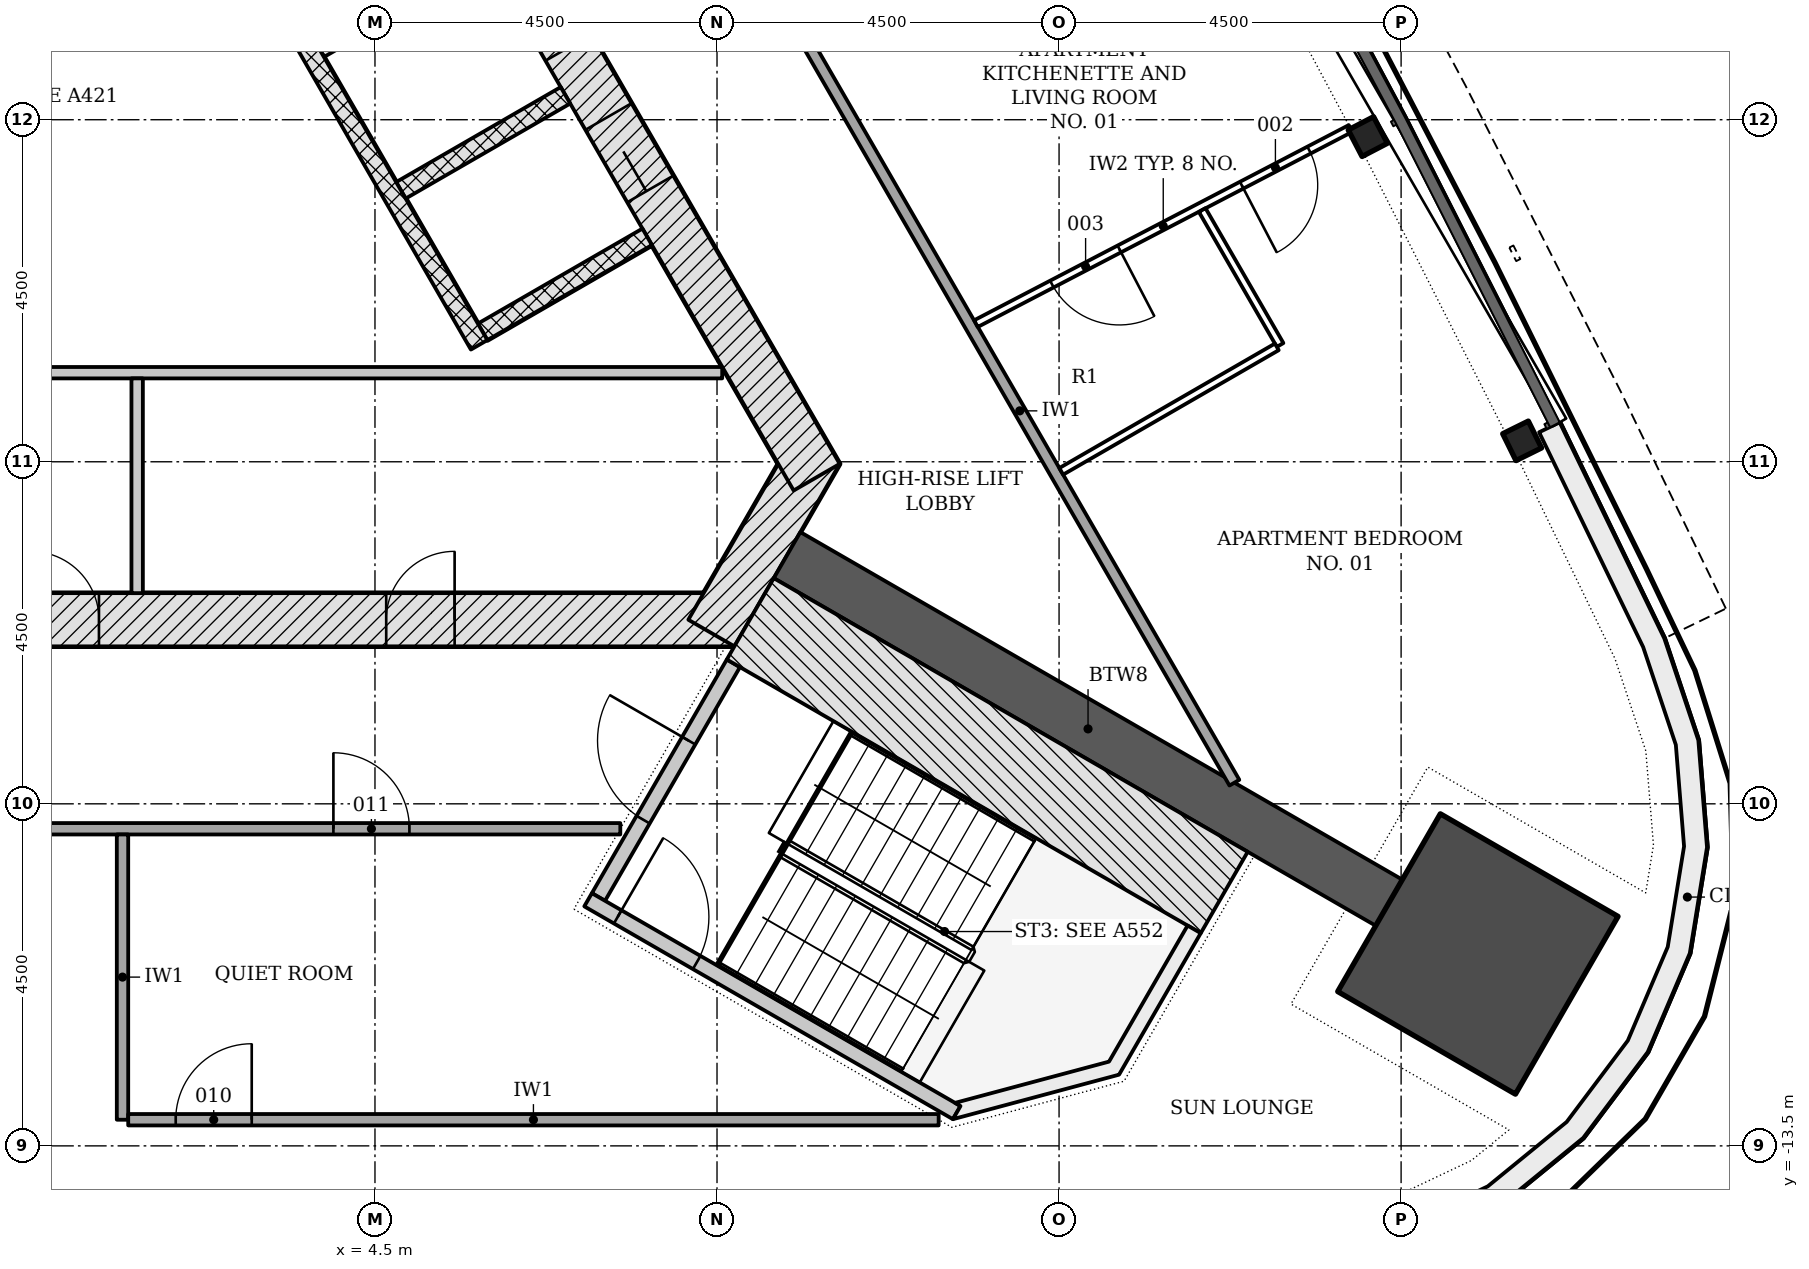
"""IFC4 building model, lengths in metres.
Left out: names, types, materials, properties, quantities, classifications, styles, units other than length and angle.
Written with IfcOpenShell. Run it as: python <this file> out.ifc"""

import sys

from ifc_helpers import new_model, si_unit, direction, frame, frame_2d, origin, origin_2d, place, context, subcontext, project, spatial, polyline, rectangle, i_section, outline, extrude, element, fill, save


model = new_model("IFC4")
c1 = context("Model", 3, precision=1e-05, world=origin(), true_north=direction((0.0, 1.0)))
c2 = subcontext(c1, "Body", "Model", "MODEL_VIEW")
j1 = project(units=[si_unit("LENGTHUNIT", "METRE"), si_unit("PLANEANGLEUNIT", "RADIAN")], contexts=[c1])
p1 = place(None, origin())
s1 = spatial("IfcSite", under=j1, at=p1, CompositionType="ELEMENT")
p2 = place(p1, origin())
s2 = spatial("IfcBuilding", under=s1, at=p2, CompositionType="ELEMENT")
p3 = place(p2, frame((0.0, 0.0, 192.3)))
s3 = spatial("IfcBuildingStorey", under=s2, at=p3, CompositionType="ELEMENT", Elevation=192.3)
p4 = place(p3, frame((-9.229, -6.578, -0.2), z_axis=(0.0, 0.0, 1.0), x_axis=(1.0, 0.0, 0.0)))
e1 = element("IfcWall", 1, at=p4, inside=s3, PredefinedType="SHEAR", context=c2, shape_type="SweptSolid", body=[
    extrude(rectangle(XDim=18.458, YDim=0.7, at=frame_2d((9.229, 0.0))), origin(), (0.0, 0.0, 1.0), 3.6),
])
p5 = place(p4, frame((6.1, 0.0, 0.2)))
e2 = element("IfcOpeningElement", 2, at=p5, cuts=e1, PredefinedType="OPENING", context=c2, shape_type="SweptSolid", body=[
    extrude(rectangle(XDim=1.0, YDim=2.1, at=frame_2d((0.5, 1.05))), frame((0.0, 0.36, 0.0), z_axis=(0.0, -1.0, 0.0), x_axis=(1.0, 0.0, 0.0)), (0.0, 0.0, 1.0), 0.72),
])
p6 = place(p4, frame((2.615, 0.0, 0.2)))
e3 = element("IfcOpeningElement", 3, at=p6, cuts=e1, PredefinedType="OPENING", context=c2, shape_type="SweptSolid", body=[
    extrude(rectangle(XDim=1.0, YDim=2.1, at=frame_2d((0.5, 1.05))), frame((0.0, 0.36, 0.0), z_axis=(0.0, -1.0, 0.0), x_axis=(1.0, 0.0, 0.0)), (0.0, 0.0, 1.0), 0.72),
])
p7 = place(p4, frame((9.198, 0.0, 0.2)))
e4 = element("IfcOpeningElement", 4, at=p7, cuts=e1, PredefinedType="OPENING", context=c2, shape_type="SweptSolid", body=[
    extrude(rectangle(XDim=0.9, YDim=2.1, at=frame_2d((0.45, 1.05))), frame((0.0, 0.36, 0.0), z_axis=(0.0, -1.0, 0.0), x_axis=(1.0, 0.0, 0.0)), (0.0, 0.0, 1.0), 0.72),
])
p8 = place(p4, frame((13.877, 0.0, 0.2)))
e5 = element("IfcOpeningElement", 5, at=p8, cuts=e1, PredefinedType="OPENING", context=c2, shape_type="SweptSolid", body=[
    extrude(rectangle(XDim=0.9, YDim=2.1, at=frame_2d((0.45, 1.05))), frame((0.0, 0.36, 0.0), z_axis=(0.0, -1.0, 0.0), x_axis=(1.0, 0.0, 0.0)), (0.0, 0.0, 1.0), 0.72),
])
p9 = place(p3, frame((8.926, -6.753, -0.2), z_axis=(0.0, 0.0, 1.0), x_axis=(0.500042739161, 0.866000726912, 0.0)))
e6 = element("IfcWall", 6, at=p9, inside=s3, PredefinedType="SHEAR", context=c2, shape_type="SweptSolid", body=[
    extrude(rectangle(XDim=2.771, YDim=0.7, at=frame_2d((1.386, 0.0))), origin(), (0.0, 0.0, 1.0), 3.6),
])
p10 = place(p3, frame((10.311, -4.703, -0.2), z_axis=(0.0, 0.0, 1.0), x_axis=(-0.500001446645, 0.866024568562, 0.0)))
e7 = element("IfcWall", 7, at=p10, inside=s3, PredefinedType="SHEAR", context=c2, shape_type="SweptSolid", body=[
    extrude(rectangle(XDim=18.458, YDim=0.7, at=frame_2d((9.229, 0.0))), origin(), (0.0, 0.0, 1.0), 3.6),
])
p11 = place(p10, frame((4.379, 0.0, 0.2)))
e8 = element("IfcOpeningElement", 8, at=p11, cuts=e7, PredefinedType="OPENING", context=c2, shape_type="SweptSolid", body=[
    extrude(rectangle(XDim=1.1, YDim=2.1, at=frame_2d((0.55, 1.05))), frame((0.0, 0.36, 0.0), z_axis=(0.0, -1.0, 0.0), x_axis=(1.0, 0.0, 0.0)), (0.0, 0.0, 1.0), 0.72),
])
p12 = place(p10, frame((6.529, 0.0, 0.2)))
e9 = element("IfcOpeningElement", 9, at=p12, cuts=e7, PredefinedType="OPENING", context=c2, shape_type="SweptSolid", body=[
    extrude(rectangle(XDim=1.1, YDim=2.1, at=frame_2d((0.55, 1.05))), frame((0.0, 0.36, 0.0), z_axis=(0.0, -1.0, 0.0), x_axis=(1.0, 0.0, 0.0)), (0.0, 0.0, 1.0), 0.72),
])
p13 = place(p10, frame((8.679, 0.0, 0.2)))
e10 = element("IfcOpeningElement", 10, at=p13, cuts=e7, PredefinedType="OPENING", context=c2, shape_type="SweptSolid", body=[
    extrude(rectangle(XDim=1.1, YDim=2.1, at=frame_2d((0.55, 1.05))), frame((0.0, 0.36, 0.0), z_axis=(0.0, -1.0, 0.0), x_axis=(1.0, 0.0, 0.0)), (0.0, 0.0, 1.0), 0.72),
])
p14 = place(p10, frame((10.829, 0.0, 0.2)))
e11 = element("IfcOpeningElement", 11, at=p14, cuts=e7, PredefinedType="OPENING", context=c2, shape_type="SweptSolid", body=[
    extrude(rectangle(XDim=1.1, YDim=2.1, at=frame_2d((0.55, 1.05))), frame((0.0, 0.36, 0.0), z_axis=(0.0, -1.0, 0.0), x_axis=(1.0, 0.0, 0.0)), (0.0, 0.0, 1.0), 0.72),
])
p15 = place(p10, frame((12.979, 0.0, 0.2)))
e12 = element("IfcOpeningElement", 12, at=p15, cuts=e7, PredefinedType="OPENING", context=c2, shape_type="SweptSolid", body=[
    extrude(rectangle(XDim=1.1, YDim=2.1, at=frame_2d((0.55, 1.05))), frame((0.0, 0.36, 0.0), z_axis=(0.0, -1.0, 0.0), x_axis=(1.0, 0.0, 0.0)), (0.0, 0.0, 1.0), 0.72),
])
p16 = place(p3, frame((9.922, -5.728, -0.2), z_axis=(0.0, 0.0, 1.0), x_axis=(0.866026421479, -0.499998237297, 0.0)))
e13 = element("IfcWall", 13, at=p16, inside=s3, PredefinedType="SHEAR", context=c2, shape_type="SweptSolid", body=[
    extrude(rectangle(XDim=9.145, YDim=0.7, at=frame_2d((4.572, 0.0))), origin(), (0.0, 0.0, 1.0), 3.6),
])
p17 = place(p3, frame((19.01, -10.976, -0.2), z_axis=(0.0, 0.0, 1.0), x_axis=(0.866025403784, -0.5, 0.0)))
e14 = element("IfcColumn", 14, at=p17, inside=s3, PredefinedType="COLUMN", context=c2, shape_type="SweptSolid", body=[
    extrude(rectangle(XDim=2.7, YDim=2.7, at=origin_2d()), origin(), (0.0, 0.0, 1.0), 3.6),
])
for number, where, z_axis, x_axis in (
    (15, (19.593, -4.225, -0.2), (0.0, 0.0, 1.0), (-0.443, 0.897, 0.0)),
    (16, (17.562, -0.222, -0.2), (0.0, 0.0, 1.0), (-0.462, 0.887, 0.0)),
):
    element("IfcColumn", number, at=place(p3, frame(where, z_axis=z_axis, x_axis=x_axis)), inside=s3, PredefinedType="COLUMN", context=c2, shape_type="SweptSolid", body=[
        extrude(i_section(OverallWidth=0.394, OverallDepth=0.376, WebThickness=0.017, FlangeThickness=0.028, FilletRadius=0.015, at=origin_2d()), origin(), (0.0, 0.0, 1.0), 3.6),
    ])
p18 = place(p3, origin())
e17 = element("IfcWall", 17, at=p18, inside=s3, PredefinedType="NOTDEFINED", context=c2, shape_type="SweptSolid", body=[
    extrude(outline(polyline([(13.49, -15.404), (16.641, -15.175), (18.025, -14.893), (19.302, -14.288), (20.396, -13.395), (21.245, -12.266), (21.798, -10.966), (22.025, -9.572), (21.91, -8.164), (21.463, -6.824), (20.086, -3.981), (19.816, -4.112), (21.184, -6.937), (21.615, -8.224), (21.723, -9.56), (21.508, -10.882), (20.983, -12.115), (20.178, -13.186), (19.14, -14.032), (17.929, -14.606), (16.6, -14.877), (13.469, -15.105), (13.49, -15.404)])), origin(), (0.0, 0.0, 1.0), 3.3),
])
for number, where, z_axis, x_axis in (
    (18, (8.081, -1.541, -0.2), (0.0, 0.0, 1.0), (-0.866, -0.5, 0.0)),
    (19, (7.006, 0.321, -0.2), (0.0, 0.0, 1.0), (-0.866, -0.5, 0.0)),
):
    element("IfcWall", number, at=place(p3, frame(where, z_axis=z_axis, x_axis=x_axis)), inside=s3, PredefinedType="PARTITIONING", context=c2, shape_type="SweptSolid", body=[
        extrude(rectangle(XDim=2.5, YDim=0.25, at=frame_2d((1.25, 0.0))), origin(), (0.0, 0.0, 1.0), 3.6),
    ])
p19 = place(p3, frame((5.931, 2.183, -0.2), z_axis=(0.0, 0.0, 1.0), x_axis=(-0.866047370643, -0.499961950354, 0.0)))
e20 = element("IfcWall", 20, at=p19, inside=s3, PredefinedType="PARTITIONING", context=c2, shape_type="SweptSolid", body=[
    extrude(rectangle(XDim=2.5, YDim=0.25, at=frame_2d((1.25, 0.0))), origin(), (0.0, 0.0, 1.0), 3.6),
])
p20 = place(p3, frame((5.87, -2.961, 0.0), z_axis=(0.0, 0.0, 1.0), x_axis=(-0.50000615651, 0.866021849293, 0.0)))
e21 = element("IfcWall", 21, at=p20, inside=s3, PredefinedType="PARTITIONING", context=c2, shape_type="SweptSolid", body=[
    extrude(rectangle(XDim=11.0, YDim=0.25, at=frame_2d((5.5, 0.0))), origin(), (0.0, 0.0, 1.0), 3.4),
])
p21 = place(p3, frame((-1.479, -3.328, 0.0), z_axis=(0.0, 0.0, 1.0), x_axis=(1.0, 0.0, 0.0)))
e22 = element("IfcWall", 22, at=p21, inside=s3, PredefinedType="PARTITIONING", context=c2, shape_type="SweptSolid", body=[
    extrude(rectangle(XDim=10.547, YDim=0.15, at=frame_2d((5.273, 0.0))), origin(), (0.0, 0.0, 1.0), 3.4),
])
p22 = place(p3, frame((1.371, -3.403, 0.0), z_axis=(0.0, 0.0, 1.0), x_axis=(0.0, -1.0, 0.0)))
e23 = element("IfcWall", 23, at=p22, inside=s3, PredefinedType="PARTITIONING", context=c2, shape_type="SweptSolid", body=[
    extrude(rectangle(XDim=2.825, YDim=0.15, at=frame_2d((1.413, 0.0))), origin(), (0.0, 0.0, 1.0), 3.4),
])
p23 = place(p3, frame((7.44, -10.226, -0.2), z_axis=(0.0, 0.0, 1.0), x_axis=(0.500022077904, 0.866012656725, 0.0)))
e24 = element("IfcWall", 24, at=p23, inside=s3, PredefinedType="SHEAR", context=c2, shape_type="SweptSolid", body=[
    extrude(rectangle(XDim=3.55, YDim=0.2, at=frame_2d((1.775, 0.0))), origin(), (0.0, 0.0, 1.0), 3.6),
])
p24 = place(p23, frame((1.175, 0.0, 0.2)))
e25 = element("IfcOpeningElement", 25, at=p24, cuts=e24, PredefinedType="OPENING", context=c2, shape_type="SweptSolid", body=[
    extrude(rectangle(XDim=1.2, YDim=2.1, at=frame_2d((0.6, 1.05))), frame((0.0, 0.11, 0.0), z_axis=(0.0, -1.0, 0.0), x_axis=(1.0, 0.0, 0.0)), (0.0, 0.0, 1.0), 0.22),
])
p25 = place(p3, frame((7.304, -10.262, -0.2), z_axis=(0.0, 0.0, 1.0), x_axis=(0.866026594901, -0.49999793692, 0.0)))
e26 = element("IfcWall", 26, at=p25, inside=s3, PredefinedType="SHEAR", context=c2, shape_type="SweptSolid", body=[
    extrude(rectangle(XDim=5.6, YDim=0.2, at=frame_2d((2.8, 0.0))), origin(), (0.0, 0.0, 1.0), 3.6),
])
p26 = place(p25, frame((0.45, 0.0, 0.2)))
e27 = element("IfcOpeningElement", 27, at=p26, cuts=e26, PredefinedType="OPENING", context=c2, shape_type="SweptSolid", body=[
    extrude(rectangle(XDim=1.2, YDim=2.1, at=frame_2d((0.6, 1.05))), frame((0.0, 0.11, 0.0), z_axis=(0.0, -1.0, 0.0), x_axis=(1.0, 0.0, 0.0)), (0.0, 0.0, 1.0), 0.22),
])
p27 = place(p3, frame((9.438, -6.566, -0.2), z_axis=(0.0, 0.0, 1.0), x_axis=(0.866026919366, -0.499997374926, 0.0)))
e28 = element("IfcWall", 28, at=p27, inside=s3, PredefinedType="SHEAR", context=c2, shape_type="SweptSolid", body=[
    extrude(rectangle(XDim=7.2, YDim=1.236, at=frame_2d((3.6, 0.0))), origin(), (0.0, 0.0, 1.0), 3.6),
])
p28 = place(p3, frame((0.0, 0.0, -0.2)))
e29 = element("IfcWall", 29, at=p28, inside=s3, PredefinedType="SHEAR", context=c2, shape_type="SweptSolid", body=[
    extrude(outline(polyline([(12.104, -13.149), (14.289, -12.563), (15.364, -10.701), (15.191, -10.601), (14.157, -12.392), (12.132, -12.934), (12.204, -12.976), (12.204, -12.976), (12.204, -12.976), (12.204, -12.976), (12.204, -12.976), (12.204, -12.976), (12.204, -12.976), (12.204, -12.976), (12.204, -12.976), (12.204, -12.976), (12.204, -12.976), (12.204, -12.976), (12.204, -12.976), (12.204, -12.976), (12.204, -12.976), (12.204, -12.976), (12.204, -12.976), (12.104, -13.149)])), origin(), (0.0, 0.0, 1.0), 3.6),
])
p29 = place(p3, frame((15.807, -8.722, 0.0), z_axis=(0.0, 0.0, 1.0), x_axis=(-0.500004300164, 0.866022921069, 0.0)))
e30 = element("IfcWall", 30, at=p29, inside=s3, PredefinedType="PARTITIONING", context=c2, shape_type="SweptSolid", body=[
    extrude(rectangle(XDim=11.297, YDim=0.15, at=frame_2d((5.649, 0.0))), origin(), (0.0, 0.0, 1.0), 2.852),
])
p30 = place(p3, frame((17.334, -0.115, 0.0), z_axis=(0.0, 0.0, 1.0), x_axis=(-0.886851071155, -0.462055383684, 0.0)))
e31 = element("IfcWall", 31, at=p30, inside=s3, PredefinedType="PARTITIONING", context=c2, shape_type="SweptSolid", body=[
    extrude(rectangle(XDim=5.556, YDim=0.1, at=frame_2d((2.778, 0.0))), origin(), (0.0, 0.0, 1.0), 3.4),
])
p31 = place(p30, frame((0.614, 0.0, 0.0)))
e32 = element("IfcOpeningElement", 32, at=p31, cuts=e31, PredefinedType="OPENING", context=c2, shape_type="SweptSolid", body=[
    extrude(rectangle(XDim=1.0, YDim=2.1, at=frame_2d((0.5, 1.05))), frame((0.0, 0.06, 0.0), z_axis=(0.0, -1.0, 0.0), x_axis=(1.0, 0.0, 0.0)), (0.0, 0.0, 1.0), 0.12),
])
p32 = place(p30, frame((3.43, 0.0, 0.0)))
e33 = element("IfcOpeningElement", 33, at=p32, cuts=e31, PredefinedType="OPENING", context=c2, shape_type="SweptSolid", body=[
    extrude(rectangle(XDim=1.0, YDim=2.1, at=frame_2d((0.5, 1.05))), frame((0.0, 0.06, 0.0), z_axis=(0.0, -1.0, 0.0), x_axis=(1.0, 0.0, 0.0)), (0.0, 0.0, 1.0), 0.12),
])
p33 = place(p3, frame((15.383, -1.188, 0.0), z_axis=(0.0, 0.0, 1.0), x_axis=(0.500007699544, -0.866020958405, 0.0)))
e34 = element("IfcWall", 34, at=p33, inside=s3, PredefinedType="PARTITIONING", context=c2, shape_type="SweptSolid", body=[
    extrude(rectangle(XDim=2.05, YDim=0.1, at=frame_2d((1.025, 0.0))), origin(), (0.0, 0.0, 1.0), 2.852),
])
p34 = place(p3, frame((16.365, -2.989, 0.0), z_axis=(0.0, 0.0, 1.0), x_axis=(-0.866027924134, -0.499995634601, 0.0)))
e35 = element("IfcWall", 35, at=p34, inside=s3, PredefinedType="PARTITIONING", context=c2, shape_type="SweptSolid", body=[
    extrude(rectangle(XDim=3.275, YDim=0.1, at=frame_2d((1.637, 0.0))), origin(), (0.0, 0.0, 1.0), 3.4),
])
p35 = place(p3, frame((0.2, -9.328, 0.0), z_axis=(0.0, 0.0, 1.0), x_axis=(1.0, 0.0, 0.0)))
e36 = element("IfcWall", 36, at=p35, inside=s3, PredefinedType="PARTITIONING", context=c2, shape_type="SweptSolid", body=[
    extrude(rectangle(XDim=7.528, YDim=0.15, at=frame_2d((3.764, 0.0))), origin(), (0.0, 0.0, 1.0), 2.852),
])
p36 = place(p35, frame((3.753, 0.0, 0.0)))
e37 = element("IfcOpeningElement", 37, at=p36, cuts=e36, PredefinedType="OPENING", context=c2, shape_type="SweptSolid", body=[
    extrude(rectangle(XDim=1.0, YDim=2.1, at=frame_2d((0.5, 1.05))), frame((0.0, 0.085, 0.0), z_axis=(0.0, -1.0, 0.0), x_axis=(1.0, 0.0, 0.0)), (0.0, 0.0, 1.0), 0.17),
])
p37 = place(p3, frame((1.179, -9.403, 0.0), z_axis=(0.0, 0.0, 1.0), x_axis=(0.0, -1.0, 0.0)))
e38 = element("IfcWall", 38, at=p37, inside=s3, PredefinedType="PARTITIONING", context=c2, shape_type="SweptSolid", body=[
    extrude(rectangle(XDim=3.753, YDim=0.15, at=frame_2d((1.876, 0.0))), origin(), (0.0, 0.0, 1.0), 3.4),
])
p38 = place(p3, frame((1.254, -13.156, 0.0), z_axis=(0.0, 0.0, 1.0), x_axis=(1.0, 0.0, 0.0)))
e39 = element("IfcWall", 39, at=p38, inside=s3, PredefinedType="PARTITIONING", context=c2, shape_type="SweptSolid", body=[
    extrude(rectangle(XDim=10.662, YDim=0.15, at=frame_2d((5.331, 0.0))), origin(), (0.0, 0.0, 1.0), 2.852),
])
p39 = place(p38, frame((0.625, 0.0, 0.0)))
e40 = element("IfcOpeningElement", 40, at=p39, cuts=e39, PredefinedType="OPENING", context=c2, shape_type="SweptSolid", body=[
    extrude(rectangle(XDim=1.0, YDim=2.1, at=frame_2d((0.5, 1.05))), frame((0.0, 0.085, 0.0), z_axis=(0.0, -1.0, 0.0), x_axis=(1.0, 0.0, 0.0)), (0.0, 0.0, 1.0), 0.17),
])
p40 = place(p11, origin())
e41 = element("IfcDoor", 41, at=p40, inside=s3, OperationType="DOUBLE_DOOR_SLIDING", PredefinedType="DOOR", context=c2, shape_type="SweptSolid", body=[
    extrude(rectangle(XDim=1.1, YDim=2.1, at=frame_2d((0.55, 1.05))), frame((0.0, 0.025, 0.0), z_axis=(0.0, -1.0, 0.0), x_axis=(1.0, 0.0, 0.0)), (0.0, 0.0, 1.0), 0.05),
])
fill(e8, e41)
p41 = place(p7, origin())
e42 = element("IfcDoor", 42, at=p41, inside=s3, OperationType="SINGLE_SWING_LEFT", PredefinedType="DOOR", context=c2, shape_type="SweptSolid", body=[
    extrude(rectangle(XDim=0.9, YDim=2.1, at=frame_2d((0.45, 1.05))), frame((0.0, 0.075, 0.0), z_axis=(0.0, -1.0, 0.0), x_axis=(1.0, 0.0, 0.0)), (0.0, 0.0, 1.0), 0.15),
])
fill(e4, e42)
p42 = place(p8, origin())
e43 = element("IfcDoor", 43, at=p42, inside=s3, OperationType="SINGLE_SWING_RIGHT", PredefinedType="DOOR", context=c2, shape_type="SweptSolid", body=[
    extrude(rectangle(XDim=0.9, YDim=2.1, at=frame_2d((0.45, 1.05))), frame((0.0, 0.075, 0.0), z_axis=(0.0, -1.0, 0.0), x_axis=(1.0, 0.0, 0.0)), (0.0, 0.0, 1.0), 0.15),
])
fill(e5, e43)
p43 = place(p24, origin())
e44 = element("IfcDoor", 44, at=p43, inside=s3, OperationType="SINGLE_SWING_RIGHT", PredefinedType="DOOR", context=c2, shape_type="SweptSolid", body=[
    extrude(rectangle(XDim=1.2, YDim=2.1, at=frame_2d((0.6, 1.05))), frame((0.0, 0.025, 0.0), z_axis=(0.0, -1.0, 0.0), x_axis=(1.0, 0.0, 0.0)), (0.0, 0.0, 1.0), 0.05),
])
fill(e25, e44)
p44 = place(p26, origin())
e45 = element("IfcDoor", 45, at=p44, inside=s3, OperationType="SINGLE_SWING_LEFT", PredefinedType="DOOR", context=c2, shape_type="SweptSolid", body=[
    extrude(rectangle(XDim=1.2, YDim=2.1, at=frame_2d((0.6, 1.05))), frame((0.0, 0.025, 0.0), z_axis=(0.0, -1.0, 0.0), x_axis=(1.0, 0.0, 0.0)), (0.0, 0.0, 1.0), 0.05),
])
fill(e27, e45)
p45 = place(p31, origin())
e46 = element("IfcDoor", 46, at=p45, inside=s3, OperationType="SINGLE_SWING_RIGHT", PredefinedType="DOOR", context=c2, shape_type="SweptSolid", body=[
    extrude(rectangle(XDim=1.0, YDim=2.1, at=frame_2d((0.5, 1.05))), frame((0.0, 0.025, 0.0), z_axis=(0.0, -1.0, 0.0), x_axis=(1.0, 0.0, 0.0)), (0.0, 0.0, 1.0), 0.05),
])
fill(e32, e46)
p46 = place(p32, origin())
e47 = element("IfcDoor", 47, at=p46, inside=s3, OperationType="SINGLE_SWING_LEFT", PredefinedType="DOOR", context=c2, shape_type="SweptSolid", body=[
    extrude(rectangle(XDim=1.0, YDim=2.1, at=frame_2d((0.5, 1.05))), frame((0.0, 0.025, 0.0), z_axis=(0.0, -1.0, 0.0), x_axis=(1.0, 0.0, 0.0)), (0.0, 0.0, 1.0), 0.05),
])
fill(e33, e47)
p47 = place(p39, origin())
e48 = element("IfcDoor", 48, at=p47, inside=s3, OperationType="SINGLE_SWING_RIGHT", PredefinedType="DOOR", context=c2, shape_type="SweptSolid", body=[
    extrude(rectangle(XDim=1.0, YDim=2.1, at=frame_2d((0.5, 1.05))), frame((0.0, 0.025, 0.0), z_axis=(0.0, -1.0, 0.0), x_axis=(1.0, 0.0, 0.0)), (0.0, 0.0, 1.0), 0.05),
])
fill(e40, e48)
p48 = place(p36, origin())
e49 = element("IfcDoor", 49, at=p48, inside=s3, OperationType="SINGLE_SWING_LEFT", PredefinedType="DOOR", context=c2, shape_type="SweptSolid", body=[
    extrude(rectangle(XDim=1.0, YDim=2.1, at=frame_2d((0.5, 1.05))), frame((0.0, 0.025, 0.0), z_axis=(0.0, -1.0, 0.0), x_axis=(1.0, 0.0, 0.0)), (0.0, 0.0, 1.0), 0.05),
])
fill(e37, e49)
save(model, sys.argv[1])
